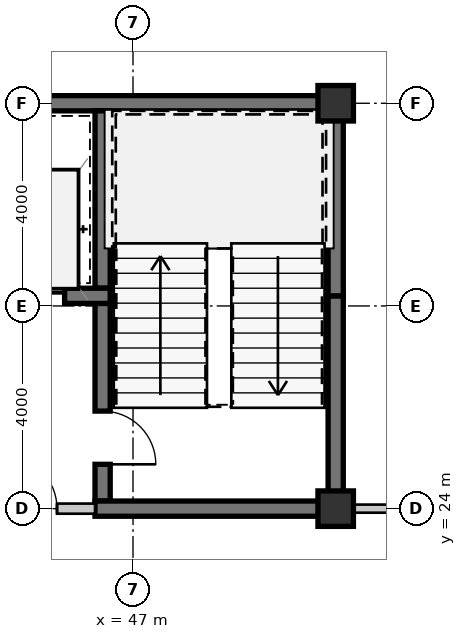
"""IFC4 building model, lengths in metres.
Left out: names, types, materials, properties, quantities, classifications, styles, units other than length and angle.
Written with IfcOpenShell. Run it as: python <this file> out.ifc"""

import sys

from ifc_helpers import new_model, si_unit, direction, frame, frame_2d, origin, origin_2d, place, context, subcontext, project, spatial, rectangle, extrude, source, transform, mapped, element, fill, save


model = new_model("IFC4")
c1 = context("Model", 3, precision=1e-05, world=origin(), true_north=direction((0.0, 1.0)))
c2 = subcontext(c1, "Body", "Model", "MODEL_VIEW")
j1 = project(units=[si_unit("LENGTHUNIT", "METRE"), si_unit("PLANEANGLEUNIT", "RADIAN")], contexts=[c1])
p1 = place(None, origin())
s1 = spatial("IfcSite", under=j1, at=p1, CompositionType="ELEMENT")
p2 = place(p1, origin())
s2 = spatial("IfcBuilding", under=s1, at=p2, CompositionType="ELEMENT")
p3 = place(p2, frame((0.0, 0.0, 68.25)))
s3 = spatial("IfcBuildingStorey", under=s2, at=p3, CompositionType="ELEMENT", Elevation=68.25)
m1 = source(origin(), c2, "Body", "SweptSolid", [
    extrude(rectangle(XDim=0.7, YDim=0.7, at=origin_2d()), origin(), (0.0, 0.0, 1.0), 3.15),
])
for number, where, z_axis, x_axis in (
    (1, (51.0, 24.0, 0.0), (0.0, 0.0, 1.0), (1.0, 0.0, 0.0)),
    (2, (51.0, 32.0, 0.0), (0.0, 0.0, 1.0), (1.0, 0.0, 0.0)),
):
    element("IfcColumn", number, at=place(p3, frame(where, z_axis=z_axis, x_axis=x_axis)), inside=s3, PredefinedType="COLUMN", context=c2, shape_type="MappedRepresentation", body=[
        mapped(m1, transform((0.0, 0.0, 0.0), scale=1.0)),
    ])
m2 = source(origin(), c2, "Body", "SweptSolid", [
    extrude(rectangle(XDim=11.95, YDim=0.3, at=frame_2d((5.975, 0.0))), origin(), (0.0, 0.0, 1.0), 2.93),
])
p4 = place(p3, frame((39.2, 32.0, 0.0), z_axis=(0.0, 0.0, 1.0), x_axis=(1.0, 0.0, 0.0)))
e3 = element("IfcWall", 3, at=p4, inside=s3, PredefinedType="SHEAR", context=c2, shape_type="MappedRepresentation", body=[
    mapped(m2, transform((0.0, 0.0, 0.0), scale=1.0)),
])
m3 = source(origin(), c2, "Body", "SweptSolid", [
    extrude(rectangle(XDim=4.05, YDim=0.3, at=frame_2d((2.025, 0.0))), origin(), (0.0, 0.0, 1.0), 2.93),
])
p5 = place(p3, frame((51.0, 24.15, 0.0), z_axis=(0.0, 0.0, 1.0), x_axis=(0.0, 1.0, 0.0)))
e4 = element("IfcWall", 4, at=p5, inside=s3, PredefinedType="SHEAR", context=c2, shape_type="MappedRepresentation", body=[
    mapped(m3, transform((0.0, 0.0, 0.0), scale=1.0)),
])
m4 = source(origin(), c2, "Body", "SweptSolid", [
    extrude(rectangle(XDim=3.65, YDim=0.3, at=frame_2d((1.825, 0.0))), origin(), (0.0, 0.0, 1.0), 2.93),
])
p6 = place(p3, frame((51.0, 28.2, 0.0), z_axis=(0.0, 0.0, 1.0), x_axis=(0.0, 1.0, 0.0)))
e5 = element("IfcWall", 5, at=p6, inside=s3, PredefinedType="SHEAR", context=c2, shape_type="MappedRepresentation", body=[
    mapped(m4, transform((0.0, 0.0, 0.0), scale=1.0)),
])
m5 = source(origin(), c2, "Body", "SweptSolid", [
    extrude(rectangle(XDim=3.5, YDim=0.3, at=frame_2d((1.75, 0.0))), origin(), (0.0, 0.0, 1.0), 2.93),
])
p7 = place(p3, frame((46.4, 31.85, 0.0), z_axis=(0.0, 0.0, 1.0), x_axis=(0.0, -1.0, 0.0)))
e6 = element("IfcWall", 6, at=p7, inside=s3, PredefinedType="SHEAR", context=c2, shape_type="MappedRepresentation", body=[
    mapped(m5, transform((0.0, 0.0, 0.0), scale=1.0)),
])
m6 = source(origin(), c2, "Body", "SweptSolid", [
    extrude(rectangle(XDim=3.9, YDim=0.3, at=frame_2d((1.95, 0.0))), origin(), (0.0, 0.0, 1.0), 2.93),
])
p8 = place(p3, frame((46.4, 28.05, 0.0), z_axis=(0.0, 0.0, 1.0), x_axis=(0.0, -1.0, 0.0)))
e7 = element("IfcWall", 7, at=p8, inside=s3, PredefinedType="SHEAR", context=c2, shape_type="MappedRepresentation", body=[
    mapped(m6, transform((0.0, 0.0, 0.0), scale=1.0)),
])
m7 = source(origin(), c2, "Body", "SweptSolid", [
    extrude(rectangle(XDim=1.05, YDim=2.1, at=frame_2d((0.525, 1.05))), frame((0.0, 0.16, 0.0), z_axis=(0.0, -1.0, 0.0), x_axis=(1.0, 0.0, 0.0)), (0.0, 0.0, 1.0), 0.32),
])
p9 = place(p8, frame((2.125, 0.0, 0.0)))
e8 = element("IfcOpeningElement", 8, at=p9, cuts=e7, PredefinedType="OPENING", context=c2, shape_type="MappedRepresentation", body=[
    mapped(m7, transform((0.0, 0.0, 0.0), scale=1.0)),
])
m8 = source(origin(), c2, "Body", "SweptSolid", [
    extrude(rectangle(XDim=4.9, YDim=0.3, at=frame_2d((2.45, 0.0))), origin(), (0.0, 0.0, 1.0), 2.93),
])
p10 = place(p3, frame((46.25, 24.0, 0.0), z_axis=(0.0, 0.0, 1.0), x_axis=(1.0, 0.0, 0.0)))
e9 = element("IfcWall", 9, at=p10, inside=s3, PredefinedType="SHEAR", context=c2, shape_type="MappedRepresentation", body=[
    mapped(m8, transform((0.0, 0.0, 0.0), scale=1.0)),
])
m9 = source(origin(), c2, "Body", "SweptSolid", [
    extrude(rectangle(XDim=2.9, YDim=0.3, at=frame_2d((1.45, 0.0))), origin(), (0.0, 0.0, 1.0), 2.93),
])
p11 = place(p3, frame((43.65, 28.2, 0.0), z_axis=(0.0, 0.0, 1.0), x_axis=(1.0, 0.0, 0.0)))
e10 = element("IfcWall", 10, at=p11, inside=s3, PredefinedType="SHEAR", context=c2, shape_type="MappedRepresentation", body=[
    mapped(m9, transform((0.0, 0.0, 0.0), scale=1.0)),
])
m10 = source(origin(), c2, "Body", "SweptSolid", [
    extrude(rectangle(XDim=1.1, YDim=2.15, at=frame_2d((0.55, 1.075))), frame((0.0, 0.16, 0.0), z_axis=(0.0, -1.0, 0.0), x_axis=(1.0, 0.0, 0.0)), (0.0, 0.0, 1.0), 0.32),
])
p12 = place(p11, frame((0.9, 0.0, 0.0)))
e11 = element("IfcOpeningElement", 11, at=p12, cuts=e10, PredefinedType="OPENING", context=c2, shape_type="MappedRepresentation", body=[
    mapped(m10, transform((0.0, 0.0, 0.0), scale=1.0)),
])
m11 = source(origin(), c2, "Body", "SweptSolid", [
    extrude(rectangle(XDim=2.7, YDim=0.2, at=frame_2d((1.35, 0.0))), origin(), (0.0, 0.0, 1.0), 2.397),
])
p13 = place(p3, frame((43.55, 24.0, 0.0), z_axis=(0.0, 0.0, 1.0), x_axis=(1.0, 0.0, 0.0)))
e12 = element("IfcWall", 12, at=p13, inside=s3, PredefinedType="SOLIDWALL", context=c2, shape_type="MappedRepresentation", body=[
    mapped(m11, transform((0.0, 0.0, 0.0), scale=1.0)),
])
m12 = source(origin(), c2, "Body", "SweptSolid", [
    extrude(rectangle(XDim=1.05, YDim=2.1, at=frame_2d((0.525, 1.05))), frame((0.0, 0.11, 0.0), z_axis=(0.0, -1.0, 0.0), x_axis=(1.0, 0.0, 0.0)), (0.0, 0.0, 1.0), 0.22),
])
p14 = place(p13, frame((0.9, 0.0, 0.0)))
e13 = element("IfcOpeningElement", 13, at=p14, cuts=e12, PredefinedType="OPENING", context=c2, shape_type="MappedRepresentation", body=[
    mapped(m12, transform((0.0, 0.0, 0.0), scale=1.0)),
])
m13 = source(origin(), c2, "Body", "SweptSolid", [
    extrude(rectangle(XDim=1.155, YDim=0.16, at=frame_2d((0.577, 0.0))), origin(), (0.0, 0.0, 1.0), 2.328),
])
p15 = place(p3, frame((51.15, 24.0, 0.0), z_axis=(0.0, 0.0, 1.0), x_axis=(1.0, 0.0, 0.0)))
e14 = element("IfcWall", 14, at=p15, inside=s3, PredefinedType="PARTITIONING", context=c2, shape_type="MappedRepresentation", body=[
    mapped(m13, transform((0.0, 0.0, 0.0), scale=1.0)),
])
m14 = source(origin(), c2, "Body", "SweptSolid", [
    extrude(rectangle(XDim=1.05, YDim=2.1, at=frame_2d((0.525, 1.05))), frame((0.0, 0.025, 0.0), z_axis=(0.0, -1.0, 0.0), x_axis=(1.0, 0.0, 0.0)), (0.0, 0.0, 1.0), 0.05),
])
p16 = place(p9, origin())
e15 = element("IfcDoor", 15, at=p16, inside=s3, OperationType="SINGLE_SWING_RIGHT", PredefinedType="DOOR", context=c2, shape_type="MappedRepresentation", body=[
    mapped(m14, transform((0.0, 0.0, 0.0), scale=1.0)),
])
fill(e8, e15)
m15 = source(origin(), c2, "Body", "SweptSolid", [
    extrude(rectangle(XDim=1.1, YDim=2.15, at=frame_2d((0.55, 1.075))), frame((0.0, 0.025, 0.0), z_axis=(0.0, -1.0, 0.0), x_axis=(1.0, 0.0, 0.0)), (0.0, 0.0, 1.0), 0.05),
])
p17 = place(p12, origin())
e16 = element("IfcDoor", 16, at=p17, inside=s3, OperationType="SLIDING_TO_LEFT", PredefinedType="DOOR", context=c2, shape_type="MappedRepresentation", body=[
    mapped(m15, transform((0.0, 0.0, 0.0), scale=1.0)),
])
fill(e11, e16)
p18 = place(p14, origin())
e17 = element("IfcDoor", 17, at=p18, inside=s3, OperationType="SINGLE_SWING_LEFT", PredefinedType="DOOR", context=c2, shape_type="MappedRepresentation", body=[
    mapped(m14, transform((0.0, 0.0, 0.0), scale=1.0)),
])
fill(e13, e17)
save(model, sys.argv[1])
